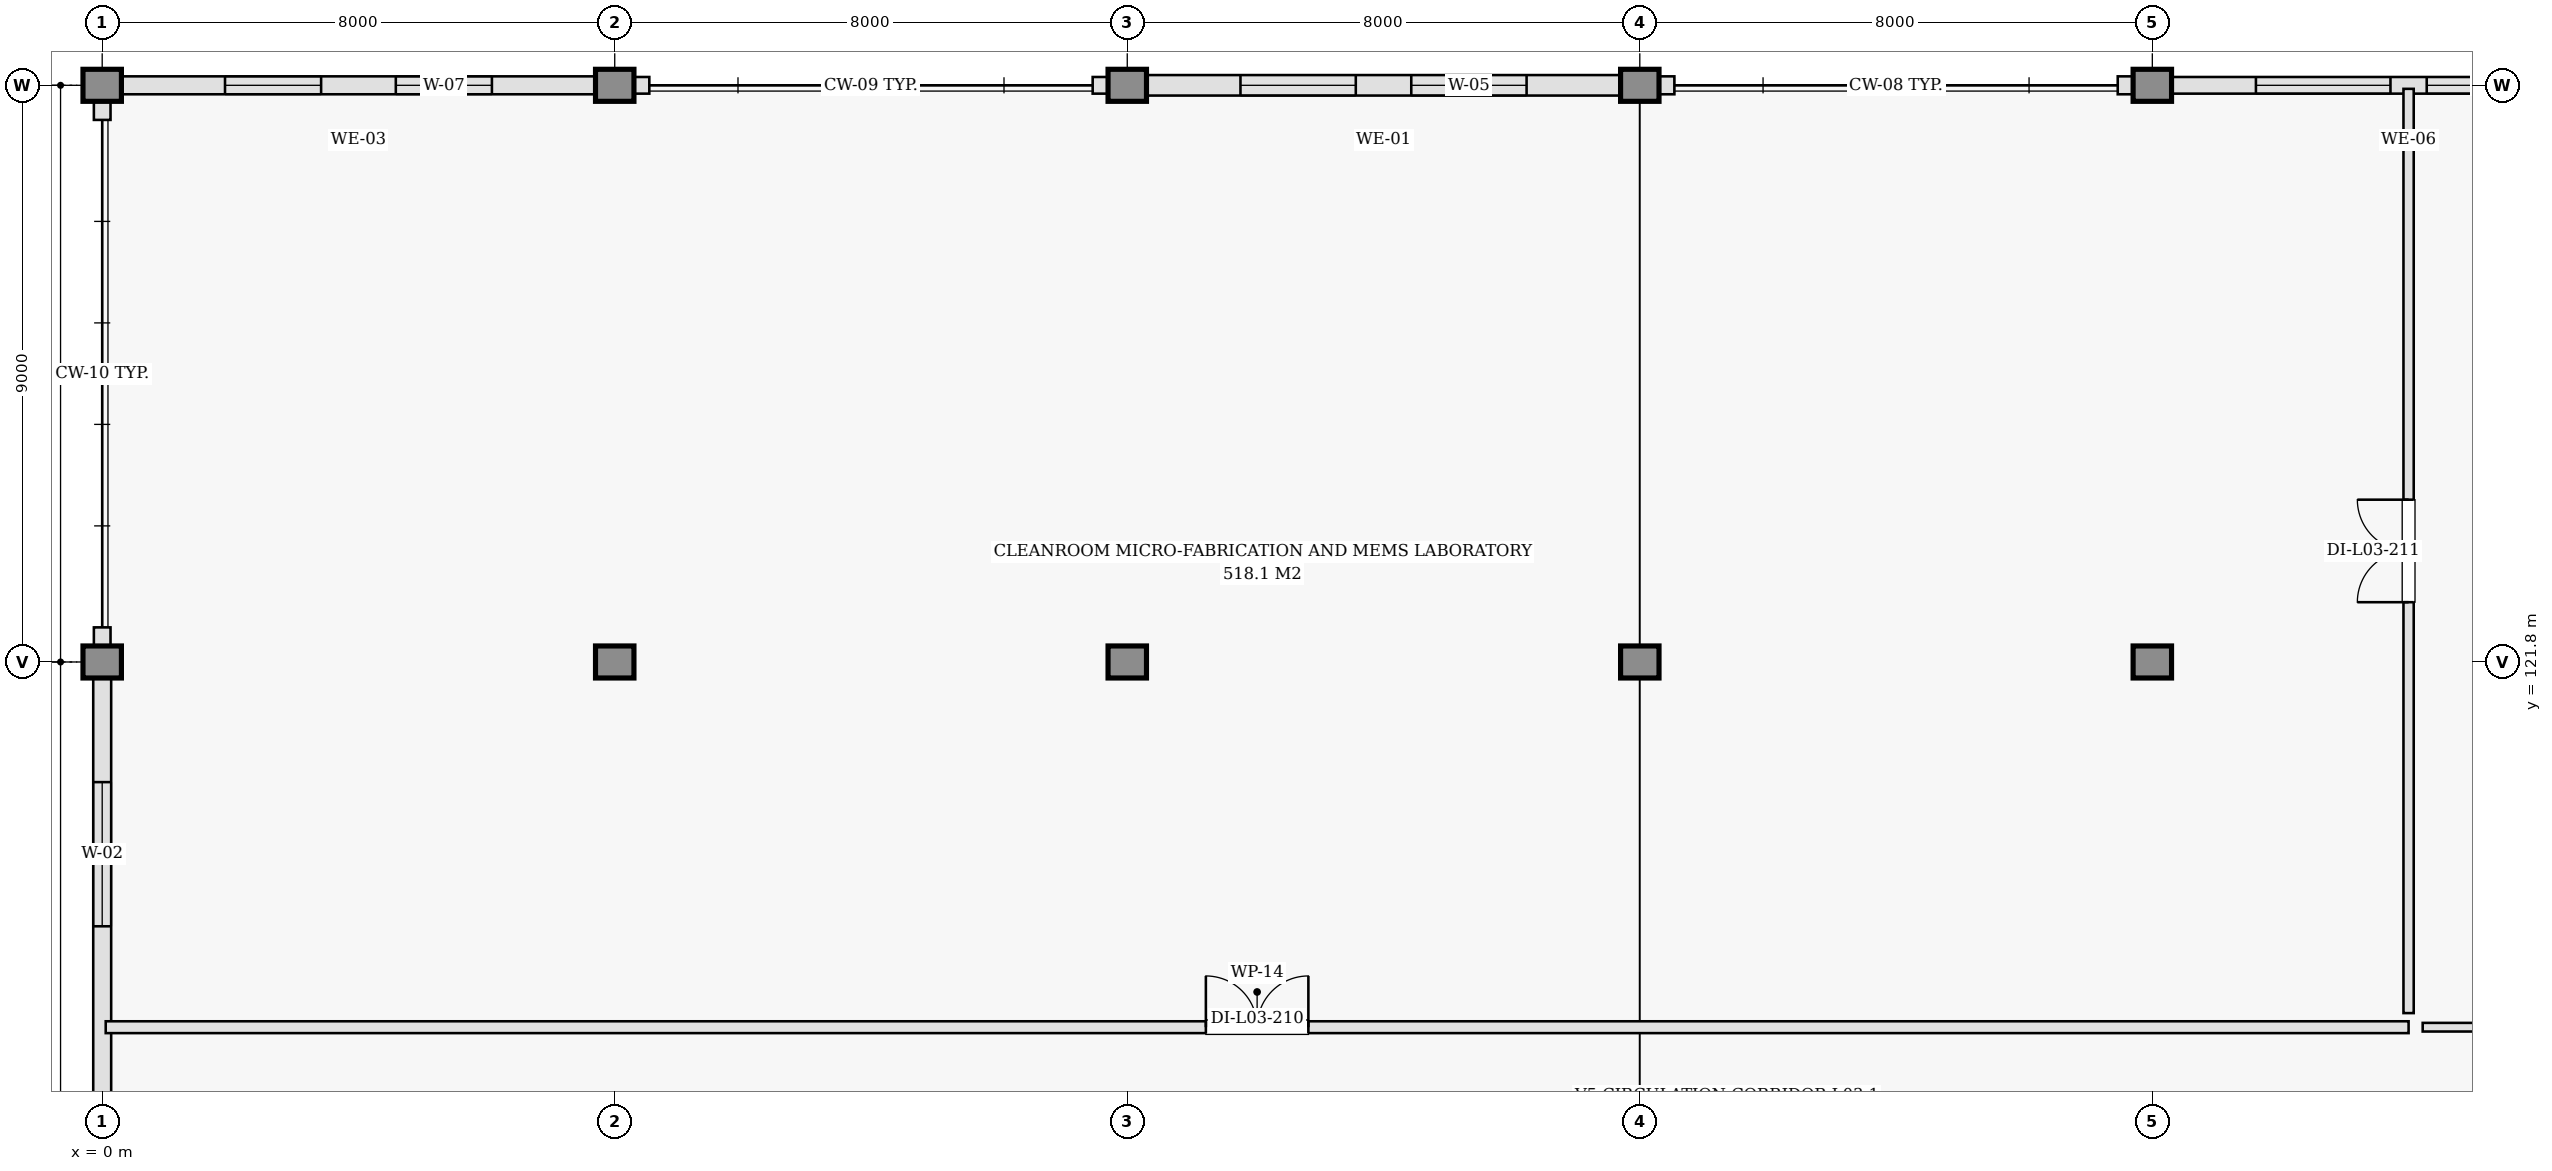
"""IFC4 building model, lengths in metres.
Left out: names, types, materials, properties, quantities, classifications, styles, units other than length and angle.
Written with IfcOpenShell. Run it as: python <this file> out.ifc"""

import sys

from ifc_helpers import new_model, si_unit, direction, frame, frame_2d, origin, origin_2d, place, context, subcontext, project, spatial, rectangle, extrude, element, fill, save


model = new_model("IFC4")
c1 = context("Model", 3, precision=1e-05, world=origin(), true_north=direction((0.0, 1.0)))
c2 = subcontext(c1, "Body", "Model", "MODEL_VIEW")
j1 = project(units=[si_unit("LENGTHUNIT", "METRE"), si_unit("PLANEANGLEUNIT", "RADIAN")], contexts=[c1])
p1 = place(None, origin())
s1 = spatial("IfcSite", under=j1, at=p1, CompositionType="ELEMENT")
p2 = place(p1, origin())
s2 = spatial("IfcBuilding", under=s1, at=p2, CompositionType="ELEMENT")
p3 = place(p2, frame((0.0, 0.0, 13.8)))
s3 = spatial("IfcBuildingStorey", under=s2, at=p3, CompositionType="ELEMENT", Elevation=13.8)
for number, where, z_axis, x_axis in (
    (1, (0.0, 121.8, 0.0), (0.0, 0.0, 1.0), (1.0, 0.0, 0.0)),
    (2, (0.0, 130.8, 0.0), (0.0, 0.0, 1.0), (1.0, 0.0, 0.0)),
    (3, (8.0, 121.8, 0.0), (0.0, 0.0, 1.0), (1.0, 0.0, 0.0)),
    (4, (8.0, 130.8, 0.0), (0.0, 0.0, 1.0), (1.0, 0.0, 0.0)),
    (5, (16.0, 121.8, 0.0), (0.0, 0.0, 1.0), (1.0, 0.0, 0.0)),
    (6, (16.0, 130.8, 0.0), (0.0, 0.0, 1.0), (1.0, 0.0, 0.0)),
    (7, (24.0, 121.8, 0.0), (0.0, 0.0, 1.0), (1.0, 0.0, 0.0)),
    (8, (24.0, 130.8, 0.0), (0.0, 0.0, 1.0), (1.0, 0.0, 0.0)),
    (9, (32.0, 121.8, 0.0), (0.0, 0.0, 1.0), (1.0, 0.0, 0.0)),
    (10, (32.0, 130.8, 0.0), (0.0, 0.0, 1.0), (1.0, 0.0, 0.0)),
):
    element("IfcColumn", number, at=place(p3, frame(where, z_axis=z_axis, x_axis=x_axis)), inside=s3, PredefinedType="COLUMN", context=c2, shape_type="SweptSolid", body=[
        extrude(rectangle(XDim=0.5, YDim=0.5, at=origin_2d()), origin(), (0.0, 0.0, 1.0), 4.2),
    ])
p4 = place(p3, frame((40.0, 130.8, 0.0), z_axis=(0.0, 0.0, 1.0), x_axis=(-1.0, 0.0, 0.0)))
e11 = element("IfcWall", 11, at=p4, inside=s3, PredefinedType="SOLIDWALL", context=c2, shape_type="SweptSolid", body=[
    extrude(rectangle(XDim=8.0, YDim=0.26, at=frame_2d((4.0, 0.0))), origin(), (0.0, 0.0, 1.0), 3.195),
])
p5 = place(p4, frame((1.617, 0.0, 0.95)))
e12 = element("IfcOpeningElement", 12, at=p5, cuts=e11, PredefinedType="OPENING", context=c2, shape_type="SweptSolid", body=[
    extrude(rectangle(XDim=2.1, YDim=1.8, at=frame_2d((1.05, 0.9))), frame((0.0, 0.14, 0.0), z_axis=(0.0, -1.0, 0.0), x_axis=(1.0, 0.0, 0.0)), (0.0, 0.0, 1.0), 0.28),
])
p6 = place(p4, frame((4.283, 0.0, 0.95)))
e13 = element("IfcOpeningElement", 13, at=p6, cuts=e11, PredefinedType="OPENING", context=c2, shape_type="SweptSolid", body=[
    extrude(rectangle(XDim=2.1, YDim=1.8, at=frame_2d((1.05, 0.9))), frame((0.0, 0.14, 0.0), z_axis=(0.0, -1.0, 0.0), x_axis=(1.0, 0.0, 0.0)), (0.0, 0.0, 1.0), 0.28),
])
for number, where, z_axis, x_axis in (
    (14, (32.0, 130.8, 0.0), (0.0, 0.0, 1.0), (-1.0, 0.0, 0.0)),
    (15, (24.54, 130.8, 0.0), (0.0, 0.0, 1.0), (-1.0, 0.0, 0.0)),
):
    element("IfcWall", number, at=place(p3, frame(where, z_axis=z_axis, x_axis=x_axis)), inside=s3, PredefinedType="SOLIDWALL", context=c2, shape_type="SweptSolid", body=[
        extrude(rectangle(XDim=0.54, YDim=0.28, at=frame_2d((0.27, 0.0))), origin(), (0.0, 0.0, 1.0), 3.195),
    ])
p7 = place(p3, frame((24.0, 130.8, 0.0), z_axis=(0.0, 0.0, 1.0), x_axis=(-1.0, 0.0, 0.0)))
e16 = element("IfcWall", 16, at=p7, inside=s3, PredefinedType="SOLIDWALL", context=c2, shape_type="SweptSolid", body=[
    extrude(rectangle(XDim=8.0, YDim=0.32, at=frame_2d((4.0, 0.0))), origin(), (0.0, 0.0, 1.0), 3.195),
])
p8 = place(p7, frame((1.767, 0.0, 0.95)))
e17 = element("IfcOpeningElement", 17, at=p8, cuts=e16, PredefinedType="OPENING", context=c2, shape_type="SweptSolid", body=[
    extrude(rectangle(XDim=1.8, YDim=1.75, at=frame_2d((0.9, 0.875))), frame((0.0, 0.17, 0.0), z_axis=(0.0, -1.0, 0.0), x_axis=(1.0, 0.0, 0.0)), (0.0, 0.0, 1.0), 0.34),
])
p9 = place(p7, frame((4.433, 0.0, 0.95)))
e18 = element("IfcOpeningElement", 18, at=p9, cuts=e16, PredefinedType="OPENING", context=c2, shape_type="SweptSolid", body=[
    extrude(rectangle(XDim=1.8, YDim=1.75, at=frame_2d((0.9, 0.875))), frame((0.0, 0.17, 0.0), z_axis=(0.0, -1.0, 0.0), x_axis=(1.0, 0.0, 0.0)), (0.0, 0.0, 1.0), 0.34),
])
for number, where, z_axis, x_axis in (
    (19, (16.0, 130.8, 0.0), (0.0, 0.0, 1.0), (-1.0, 0.0, 0.0)),
    (20, (8.54, 130.8, 0.0), (0.0, 0.0, 1.0), (-1.0, 0.0, 0.0)),
):
    element("IfcWall", number, at=place(p3, frame(where, z_axis=z_axis, x_axis=x_axis)), inside=s3, PredefinedType="SOLIDWALL", context=c2, shape_type="SweptSolid", body=[
        extrude(rectangle(XDim=0.54, YDim=0.26, at=frame_2d((0.27, 0.0))), origin(), (0.0, 0.0, 1.0), 3.195),
    ])
p10 = place(p3, frame((8.0, 130.8, 0.0), z_axis=(0.0, 0.0, 1.0), x_axis=(-1.0, 0.0, 0.0)))
e21 = element("IfcWall", 21, at=p10, inside=s3, PredefinedType="SOLIDWALL", context=c2, shape_type="SweptSolid", body=[
    extrude(rectangle(XDim=8.0, YDim=0.28, at=frame_2d((4.0, 0.0))), origin(), (0.0, 0.0, 1.0), 3.195),
])
p11 = place(p10, frame((1.917, 0.0, 0.95)))
e22 = element("IfcOpeningElement", 22, at=p11, cuts=e21, PredefinedType="OPENING", context=c2, shape_type="SweptSolid", body=[
    extrude(rectangle(XDim=1.5, YDim=1.65, at=frame_2d((0.75, 0.825))), frame((0.0, 0.15, 0.0), z_axis=(0.0, -1.0, 0.0), x_axis=(1.0, 0.0, 0.0)), (0.0, 0.0, 1.0), 0.3),
])
p12 = place(p10, frame((4.583, 0.0, 0.95)))
e23 = element("IfcOpeningElement", 23, at=p12, cuts=e21, PredefinedType="OPENING", context=c2, shape_type="SweptSolid", body=[
    extrude(rectangle(XDim=1.5, YDim=1.65, at=frame_2d((0.75, 0.825))), frame((0.0, 0.15, 0.0), z_axis=(0.0, -1.0, 0.0), x_axis=(1.0, 0.0, 0.0)), (0.0, 0.0, 1.0), 0.3),
])
p13 = place(p3, frame((0.0, 130.658, 0.0), z_axis=(0.0, 0.0, 1.0), x_axis=(0.0, -1.0, 0.0)))
e24 = element("IfcWall", 24, at=p13, inside=s3, PredefinedType="SOLIDWALL", context=c2, shape_type="SweptSolid", body=[
    extrude(rectangle(XDim=0.398, YDim=0.26, at=frame_2d((0.199, 0.0))), origin(), (0.0, 0.0, 1.0), 3.195),
])
p14 = place(p3, frame((0.0, 122.34, 0.0), z_axis=(0.0, 0.0, 1.0), x_axis=(0.0, -1.0, 0.0)))
e25 = element("IfcWall", 25, at=p14, inside=s3, PredefinedType="SOLIDWALL", context=c2, shape_type="SweptSolid", body=[
    extrude(rectangle(XDim=0.54, YDim=0.26, at=frame_2d((0.27, 0.0))), origin(), (0.0, 0.0, 1.0), 3.195),
])
p15 = place(p3, frame((0.0, 121.8, 0.0), z_axis=(0.0, 0.0, 1.0), x_axis=(0.0, -1.0, 0.0)))
e26 = element("IfcWall", 26, at=p15, inside=s3, PredefinedType="SOLIDWALL", context=c2, shape_type="SweptSolid", body=[
    extrude(rectangle(XDim=9.0, YDim=0.28, at=frame_2d((4.5, 0.0))), origin(), (0.0, 0.0, 1.0), 3.195),
])
p16 = place(p15, frame((1.875, 0.0, 0.95)))
e27 = element("IfcOpeningElement", 27, at=p16, cuts=e26, PredefinedType="OPENING", context=c2, shape_type="SweptSolid", body=[
    extrude(rectangle(XDim=2.25, YDim=1.8, at=frame_2d((1.125, 0.9))), frame((0.0, 0.15, 0.0), z_axis=(0.0, -1.0, 0.0), x_axis=(1.0, 0.0, 0.0)), (0.0, 0.0, 1.0), 0.3),
])
p17 = place(p3, frame((0.055, 116.1, 0.0), z_axis=(0.0, 0.0, 1.0), x_axis=(1.0, 0.0, 0.0)))
e28 = element("IfcWall", 28, at=p17, inside=s3, PredefinedType="PARTITIONING", context=c2, shape_type="SweptSolid", body=[
    extrude(rectangle(XDim=35.945, YDim=0.185, at=frame_2d((17.973, 0.0))), origin(), (0.0, 0.0, 1.0), 3.295),
])
p18 = place(p17, frame((17.172, 0.0, 0.0)))
e29 = element("IfcOpeningElement", 29, at=p18, cuts=e28, PredefinedType="OPENING", context=c2, shape_type="SweptSolid", body=[
    extrude(rectangle(XDim=1.6, YDim=2.2, at=frame_2d((0.8, 1.1))), frame((0.0, 0.103, 0.0), z_axis=(0.0, -1.0, 0.0), x_axis=(1.0, 0.0, 0.0)), (0.0, 0.0, 1.0), 0.205),
])
p19 = place(p3, frame((36.0, 116.32, 0.0), z_axis=(0.0, 0.0, 1.0), x_axis=(0.0, 1.0, 0.0)))
e30 = element("IfcWall", 30, at=p19, inside=s3, PredefinedType="PARTITIONING", context=c2, shape_type="SweptSolid", body=[
    extrude(rectangle(XDim=14.425, YDim=0.16, at=frame_2d((7.212, 0.0))), origin(), (0.0, 0.0, 1.0), 3.195),
])
p20 = place(p19, frame((6.413, 0.0, 0.0)))
e31 = element("IfcOpeningElement", 31, at=p20, cuts=e30, PredefinedType="OPENING", context=c2, shape_type="SweptSolid", body=[
    extrude(rectangle(XDim=1.6, YDim=2.2, at=frame_2d((0.8, 1.1))), frame((0.0, 0.09, 0.0), z_axis=(0.0, -1.0, 0.0), x_axis=(1.0, 0.0, 0.0)), (0.0, 0.0, 1.0), 0.18),
])
p21 = place(p3, frame((36.22, 116.1, 0.0), z_axis=(0.0, 0.0, 1.0), x_axis=(1.0, 0.0, 0.0)))
e32 = element("IfcWall", 32, at=p21, inside=s3, PredefinedType="PARTITIONING", context=c2, shape_type="SweptSolid", body=[
    extrude(rectangle(XDim=39.16, YDim=0.135, at=frame_2d((19.58, 0.0))), origin(), (0.0, 0.0, 1.0), 3.045),
])
p22 = place(p5, origin())
e33 = element("IfcWindow", 33, at=p22, inside=s3, PartitioningType="DOUBLE_PANEL_VERTICAL", PredefinedType="WINDOW", context=c2, shape_type="SweptSolid", body=[
    extrude(rectangle(XDim=2.1, YDim=1.8, at=frame_2d((1.05, 0.9))), frame((0.0, 0.03, 0.0), z_axis=(0.0, -1.0, 0.0), x_axis=(1.0, 0.0, 0.0)), (0.0, 0.0, 1.0), 0.06),
])
fill(e12, e33)
p23 = place(p6, origin())
e34 = element("IfcWindow", 34, at=p23, inside=s3, PartitioningType="DOUBLE_PANEL_VERTICAL", PredefinedType="WINDOW", context=c2, shape_type="SweptSolid", body=[
    extrude(rectangle(XDim=2.1, YDim=1.8, at=frame_2d((1.05, 0.9))), frame((0.0, 0.03, 0.0), z_axis=(0.0, -1.0, 0.0), x_axis=(1.0, 0.0, 0.0)), (0.0, 0.0, 1.0), 0.06),
])
fill(e13, e34)
p24 = place(p8, origin())
e35 = element("IfcWindow", 35, at=p24, inside=s3, PartitioningType="DOUBLE_PANEL_VERTICAL", PredefinedType="WINDOW", context=c2, shape_type="SweptSolid", body=[
    extrude(rectangle(XDim=1.8, YDim=1.75, at=frame_2d((0.9, 0.875))), frame((0.0, 0.03, 0.0), z_axis=(0.0, -1.0, 0.0), x_axis=(1.0, 0.0, 0.0)), (0.0, 0.0, 1.0), 0.06),
])
fill(e17, e35)
p25 = place(p9, origin())
e36 = element("IfcWindow", 36, at=p25, inside=s3, PartitioningType="DOUBLE_PANEL_VERTICAL", PredefinedType="WINDOW", context=c2, shape_type="SweptSolid", body=[
    extrude(rectangle(XDim=1.8, YDim=1.75, at=frame_2d((0.9, 0.875))), frame((0.0, 0.03, 0.0), z_axis=(0.0, -1.0, 0.0), x_axis=(1.0, 0.0, 0.0)), (0.0, 0.0, 1.0), 0.06),
])
fill(e18, e36)
p26 = place(p11, origin())
e37 = element("IfcWindow", 37, at=p26, inside=s3, PartitioningType="DOUBLE_PANEL_VERTICAL", PredefinedType="WINDOW", context=c2, shape_type="SweptSolid", body=[
    extrude(rectangle(XDim=1.5, YDim=1.65, at=frame_2d((0.75, 0.825))), frame((0.0, 0.03, 0.0), z_axis=(0.0, -1.0, 0.0), x_axis=(1.0, 0.0, 0.0)), (0.0, 0.0, 1.0), 0.06),
])
fill(e22, e37)
p27 = place(p12, origin())
e38 = element("IfcWindow", 38, at=p27, inside=s3, PartitioningType="DOUBLE_PANEL_VERTICAL", PredefinedType="WINDOW", context=c2, shape_type="SweptSolid", body=[
    extrude(rectangle(XDim=1.5, YDim=1.65, at=frame_2d((0.75, 0.825))), frame((0.0, 0.03, 0.0), z_axis=(0.0, -1.0, 0.0), x_axis=(1.0, 0.0, 0.0)), (0.0, 0.0, 1.0), 0.06),
])
fill(e23, e38)
p28 = place(p16, origin())
e39 = element("IfcWindow", 39, at=p28, inside=s3, PartitioningType="DOUBLE_PANEL_VERTICAL", PredefinedType="WINDOW", context=c2, shape_type="SweptSolid", body=[
    extrude(rectangle(XDim=2.25, YDim=1.8, at=frame_2d((1.125, 0.9))), frame((0.0, 0.03, 0.0), z_axis=(0.0, -1.0, 0.0), x_axis=(1.0, 0.0, 0.0)), (0.0, 0.0, 1.0), 0.06),
])
fill(e27, e39)
p29 = place(p18, origin())
e40 = element("IfcDoor", 40, at=p29, inside=s3, OperationType="DOUBLE_DOOR_SINGLE_SWING", PredefinedType="DOOR", context=c2, shape_type="SweptSolid", body=[
    extrude(rectangle(XDim=1.6, YDim=2.2, at=frame_2d((0.8, 1.1))), frame((0.0, 0.025, 0.0), z_axis=(0.0, -1.0, 0.0), x_axis=(1.0, 0.0, 0.0)), (0.0, 0.0, 1.0), 0.05),
])
fill(e29, e40)
p30 = place(p20, origin())
e41 = element("IfcDoor", 41, at=p30, inside=s3, OperationType="DOUBLE_DOOR_SINGLE_SWING", PredefinedType="DOOR", context=c2, shape_type="SweptSolid", body=[
    extrude(rectangle(XDim=1.6, YDim=2.2, at=frame_2d((0.8, 1.1))), frame((0.0, 0.025, 0.0), z_axis=(0.0, -1.0, 0.0), x_axis=(1.0, 0.0, 0.0)), (0.0, 0.0, 1.0), 0.05),
])
fill(e31, e41)
save(model, sys.argv[1])
